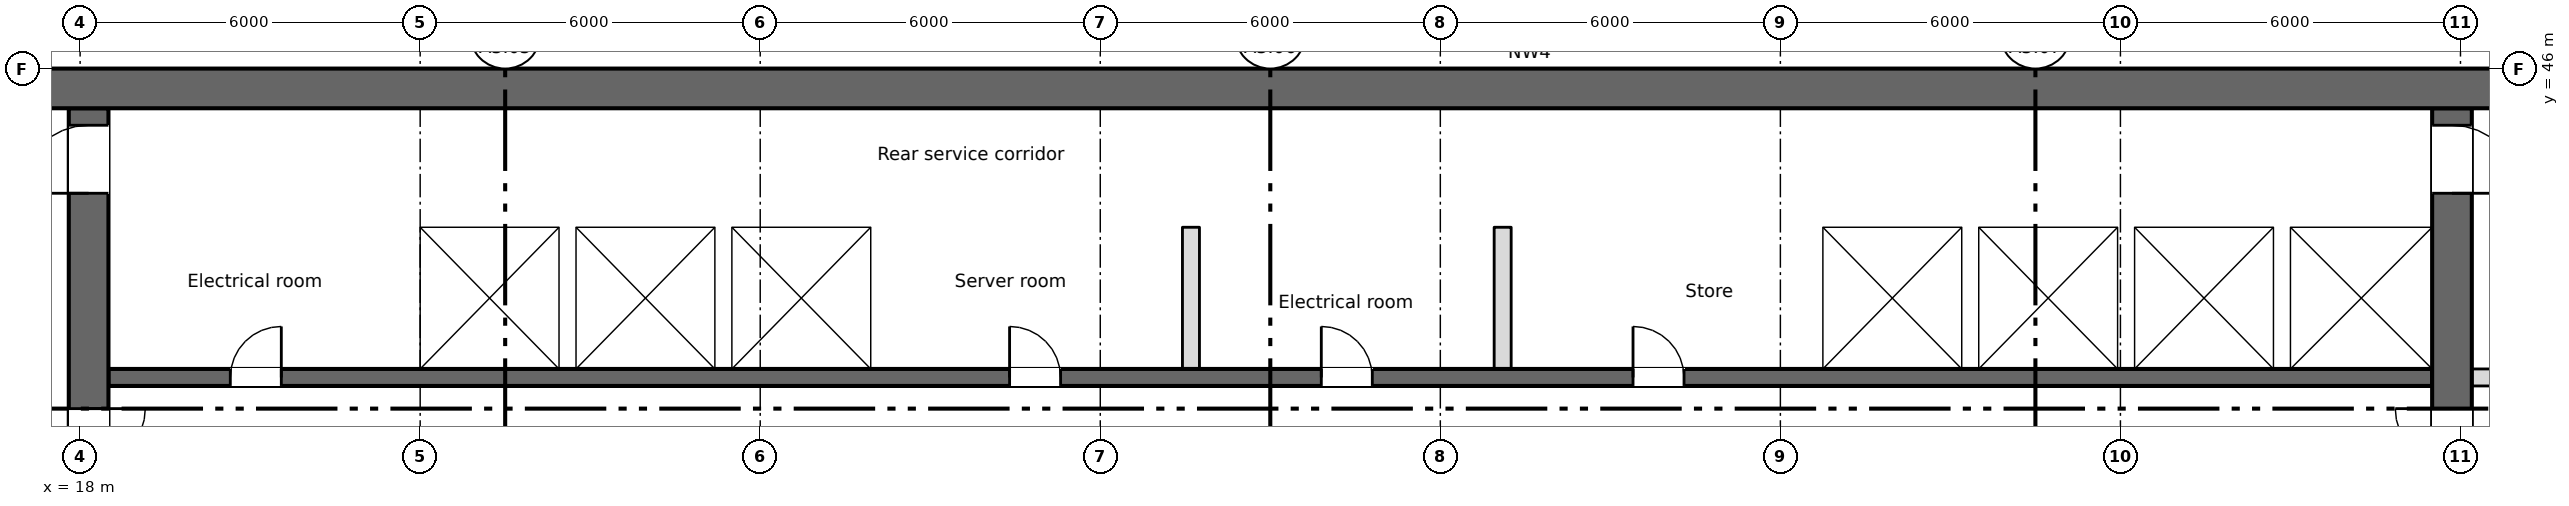
"""IFC4 building model, lengths in metres.
Left out: names, types, materials, properties, quantities, classifications, styles, units other than length and angle.
Written with IfcOpenShell. Run it as: python <this file> out.ifc"""

import sys

from ifc_helpers import new_model, si_unit, direction, frame, frame_2d, origin, place, context, subcontext, project, spatial, rectangle, extrude, element, fill, save


model = new_model("IFC4")
c1 = context("Model", 3, precision=1e-05, world=origin(), true_north=direction((0.0, 1.0)))
c2 = subcontext(c1, "Body", "Model", "MODEL_VIEW")
j1 = project(units=[si_unit("LENGTHUNIT", "METRE"), si_unit("PLANEANGLEUNIT", "RADIAN")], contexts=[c1])
p1 = place(None, origin())
s1 = spatial("IfcSite", under=j1, at=p1, CompositionType="ELEMENT")
p2 = place(p1, origin())
s2 = spatial("IfcBuilding", under=s1, at=p2, CompositionType="ELEMENT")
p3 = place(p2, frame((0.0, 0.0, 170.5)))
s3 = spatial("IfcBuildingStorey", under=s2, at=p3, CompositionType="ELEMENT", Elevation=170.5)
p4 = place(p3, frame((11.55, 45.65, 0.0), z_axis=(0.0, 0.0, 1.0), x_axis=(1.0, 0.0, 0.0)))
e1 = element("IfcWall", 1, at=p4, inside=s3, PredefinedType="SHEAR", context=c2, shape_type="SweptSolid", body=[
    extrude(rectangle(XDim=54.9, YDim=0.7, at=frame_2d((27.45, 0.0))), origin(), (0.0, 0.0, 1.0), 3.35),
])
p5 = place(p4, frame((1.2, 0.0, 0.6)))
e2 = element("IfcOpeningElement", 2, at=p5, cuts=e1, PredefinedType="OPENING", context=c2, shape_type="SweptSolid", body=[
    extrude(rectangle(XDim=0.6, YDim=2.4, at=frame_2d((0.3, 1.2))), frame((0.0, 0.36, 0.0), z_axis=(0.0, -1.0, 0.0), x_axis=(1.0, 0.0, 0.0)), (0.0, 0.0, 1.0), 0.72),
])
p6 = place(p3, frame((18.15, 28.4, 0.0), z_axis=(0.0, 0.0, 1.0), x_axis=(0.0, 1.0, 0.0)))
e3 = element("IfcWall", 3, at=p6, inside=s3, PredefinedType="SHEAR", context=c2, shape_type="SweptSolid", body=[
    extrude(rectangle(XDim=16.9, YDim=0.7, at=frame_2d((8.45, 0.0))), origin(), (0.0, 0.0, 1.0), 3.35),
])
p7 = place(p6, frame((9.6, 0.0, 0.0)))
e4 = element("IfcOpeningElement", 4, at=p7, cuts=e3, PredefinedType="OPENING", context=c2, shape_type="SweptSolid", body=[
    extrude(rectangle(XDim=2.0, YDim=2.1, at=frame_2d((1.0, 1.05))), frame((0.0, 0.36, 0.0), z_axis=(0.0, -1.0, 0.0), x_axis=(1.0, 0.0, 0.0)), (0.0, 0.0, 1.0), 0.72),
])
p8 = place(p6, frame((15.4, 0.0, 0.0)))
e5 = element("IfcOpeningElement", 5, at=p8, cuts=e3, PredefinedType="OPENING", context=c2, shape_type="SweptSolid", body=[
    extrude(rectangle(XDim=1.2, YDim=2.1, at=frame_2d((0.6, 1.05))), frame((0.0, 0.36, 0.0), z_axis=(0.0, -1.0, 0.0), x_axis=(1.0, 0.0, 0.0)), (0.0, 0.0, 1.0), 0.72),
])
p9 = place(p3, frame((59.85, 28.4, 0.0), z_axis=(0.0, 0.0, 1.0), x_axis=(0.0, 1.0, 0.0)))
e6 = element("IfcWall", 6, at=p9, inside=s3, PredefinedType="SHEAR", context=c2, shape_type="SweptSolid", body=[
    extrude(rectangle(XDim=16.9, YDim=0.7, at=frame_2d((8.45, 0.0))), origin(), (0.0, 0.0, 1.0), 3.35),
])
p10 = place(p9, frame((9.6, 0.0, 0.0)))
e7 = element("IfcOpeningElement", 7, at=p10, cuts=e6, PredefinedType="OPENING", context=c2, shape_type="SweptSolid", body=[
    extrude(rectangle(XDim=2.0, YDim=2.1, at=frame_2d((1.0, 1.05))), frame((0.0, 0.36, 0.0), z_axis=(0.0, -1.0, 0.0), x_axis=(1.0, 0.0, 0.0)), (0.0, 0.0, 1.0), 0.72),
])
p11 = place(p9, frame((15.4, 0.0, 0.0)))
e8 = element("IfcOpeningElement", 8, at=p11, cuts=e6, PredefinedType="OPENING", context=c2, shape_type="SweptSolid", body=[
    extrude(rectangle(XDim=1.2, YDim=2.1, at=frame_2d((0.6, 1.05))), frame((0.0, 0.36, 0.0), z_axis=(0.0, -1.0, 0.0), x_axis=(1.0, 0.0, 0.0)), (0.0, 0.0, 1.0), 0.72),
])
p12 = place(p3, frame((18.5, 40.55, 0.0), z_axis=(0.0, 0.0, 1.0), x_axis=(1.0, 0.0, 0.0)))
e9 = element("IfcWall", 9, at=p12, inside=s3, PredefinedType="SHEAR", context=c2, shape_type="SweptSolid", body=[
    extrude(rectangle(XDim=41.0, YDim=0.3, at=frame_2d((20.5, 0.0))), origin(), (0.0, 0.0, 1.0), 3.35),
])
p13 = place(p12, frame((2.15, 0.0, 0.0)))
e10 = element("IfcOpeningElement", 10, at=p13, cuts=e9, PredefinedType="OPENING", context=c2, shape_type="SweptSolid", body=[
    extrude(rectangle(XDim=0.9, YDim=2.1, at=frame_2d((0.45, 1.05))), frame((0.0, 0.16, 0.0), z_axis=(0.0, -1.0, 0.0), x_axis=(1.0, 0.0, 0.0)), (0.0, 0.0, 1.0), 0.32),
])
p14 = place(p12, frame((15.9, 0.0, 0.0)))
e11 = element("IfcOpeningElement", 11, at=p14, cuts=e9, PredefinedType="OPENING", context=c2, shape_type="SweptSolid", body=[
    extrude(rectangle(XDim=0.9, YDim=2.1, at=frame_2d((0.45, 1.05))), frame((0.0, 0.16, 0.0), z_axis=(0.0, -1.0, 0.0), x_axis=(1.0, 0.0, 0.0)), (0.0, 0.0, 1.0), 0.32),
])
p15 = place(p12, frame((21.4, 0.0, 0.0)))
e12 = element("IfcOpeningElement", 12, at=p15, cuts=e9, PredefinedType="OPENING", context=c2, shape_type="SweptSolid", body=[
    extrude(rectangle(XDim=0.9, YDim=2.1, at=frame_2d((0.45, 1.05))), frame((0.0, 0.16, 0.0), z_axis=(0.0, -1.0, 0.0), x_axis=(1.0, 0.0, 0.0)), (0.0, 0.0, 1.0), 0.32),
])
p16 = place(p12, frame((26.9, 0.0, 0.0)))
e13 = element("IfcOpeningElement", 13, at=p16, cuts=e9, PredefinedType="OPENING", context=c2, shape_type="SweptSolid", body=[
    extrude(rectangle(XDim=0.9, YDim=2.1, at=frame_2d((0.45, 1.05))), frame((0.0, 0.16, 0.0), z_axis=(0.0, -1.0, 0.0), x_axis=(1.0, 0.0, 0.0)), (0.0, 0.0, 1.0), 0.32),
])
p17 = place(p12, frame((6.175, 0.0, 0.0)))
e14 = element("IfcOpeningElement", 14, at=p17, cuts=e9, PredefinedType="OPENING", context=c2, shape_type="SweptSolid", body=[
    extrude(rectangle(XDim=1.1, YDim=2.1, at=frame_2d((0.55, 1.05))), frame((0.0, 0.16, 0.0), z_axis=(0.0, -1.0, 0.0), x_axis=(1.0, 0.0, 0.0)), (0.0, 0.0, 1.0), 0.32),
])
p18 = place(p12, frame((8.925, 0.0, 0.0)))
e15 = element("IfcOpeningElement", 15, at=p18, cuts=e9, PredefinedType="OPENING", context=c2, shape_type="SweptSolid", body=[
    extrude(rectangle(XDim=1.1, YDim=2.1, at=frame_2d((0.55, 1.05))), frame((0.0, 0.16, 0.0), z_axis=(0.0, -1.0, 0.0), x_axis=(1.0, 0.0, 0.0)), (0.0, 0.0, 1.0), 0.32),
])
p19 = place(p12, frame((11.675, 0.0, 0.0)))
e16 = element("IfcOpeningElement", 16, at=p19, cuts=e9, PredefinedType="OPENING", context=c2, shape_type="SweptSolid", body=[
    extrude(rectangle(XDim=1.1, YDim=2.1, at=frame_2d((0.55, 1.05))), frame((0.0, 0.16, 0.0), z_axis=(0.0, -1.0, 0.0), x_axis=(1.0, 0.0, 0.0)), (0.0, 0.0, 1.0), 0.32),
])
p20 = place(p12, frame((30.925, 0.0, 0.0)))
e17 = element("IfcOpeningElement", 17, at=p20, cuts=e9, PredefinedType="OPENING", context=c2, shape_type="SweptSolid", body=[
    extrude(rectangle(XDim=1.1, YDim=2.1, at=frame_2d((0.55, 1.05))), frame((0.0, 0.16, 0.0), z_axis=(0.0, -1.0, 0.0), x_axis=(1.0, 0.0, 0.0)), (0.0, 0.0, 1.0), 0.32),
])
p21 = place(p12, frame((33.675, 0.0, 0.0)))
e18 = element("IfcOpeningElement", 18, at=p21, cuts=e9, PredefinedType="OPENING", context=c2, shape_type="SweptSolid", body=[
    extrude(rectangle(XDim=1.1, YDim=2.1, at=frame_2d((0.55, 1.05))), frame((0.0, 0.16, 0.0), z_axis=(0.0, -1.0, 0.0), x_axis=(1.0, 0.0, 0.0)), (0.0, 0.0, 1.0), 0.32),
])
p22 = place(p12, frame((36.375, 0.0, 0.0)))
e19 = element("IfcOpeningElement", 19, at=p22, cuts=e9, PredefinedType="OPENING", context=c2, shape_type="SweptSolid", body=[
    extrude(rectangle(XDim=1.2, YDim=2.1, at=frame_2d((0.6, 1.05))), frame((0.0, 0.16, 0.0), z_axis=(0.0, -1.0, 0.0), x_axis=(1.0, 0.0, 0.0)), (0.0, 0.0, 1.0), 0.32),
])
p23 = place(p12, frame((39.15, 0.0, 0.0)))
e20 = element("IfcOpeningElement", 20, at=p23, cuts=e9, PredefinedType="OPENING", context=c2, shape_type="SweptSolid", body=[
    extrude(rectangle(XDim=1.2, YDim=2.1, at=frame_2d((0.6, 1.05))), frame((0.0, 0.16, 0.0), z_axis=(0.0, -1.0, 0.0), x_axis=(1.0, 0.0, 0.0)), (0.0, 0.0, 1.0), 0.32),
])
p24 = place(p3, frame((18.5, 43.35, 0.0), z_axis=(0.0, 0.0, 1.0), x_axis=(1.0, 0.0, 0.0)))
e21 = element("IfcWall", 21, at=p24, inside=s3, PredefinedType="SHEAR", context=c2, shape_type="SweptSolid", body=[
    extrude(rectangle(XDim=41.0, YDim=0.3, at=frame_2d((20.5, 0.0))), origin(), (0.0, 0.0, 1.0), 3.35),
])
p25 = place(p3, frame((60.2, 40.55, 0.0), z_axis=(0.0, 0.0, 1.0), x_axis=(1.0, 0.0, 0.0)))
e22 = element("IfcWall", 22, at=p25, inside=s3, PredefinedType="PARTITIONING", context=c2, shape_type="SweptSolid", body=[
    extrude(rectangle(XDim=2.5, YDim=0.3, at=frame_2d((1.25, 0.0))), origin(), (0.0, 0.0, 1.0), 3.35),
])
p26 = place(p25, frame((0.725, 0.0, 0.0)))
e23 = element("IfcOpeningElement", 23, at=p26, cuts=e22, PredefinedType="OPENING", context=c2, shape_type="SweptSolid", body=[
    extrude(rectangle(XDim=0.9, YDim=2.1, at=frame_2d((0.45, 1.05))), frame((0.0, 0.16, 0.0), z_axis=(0.0, -1.0, 0.0), x_axis=(1.0, 0.0, 0.0)), (0.0, 0.0, 1.0), 0.32),
])
for number, where, z_axis, x_axis in (
    (24, (23.85, 40.7, 0.0), (0.0, 0.0, 1.0), (0.0, 1.0, 0.0)),
    (25, (26.6, 40.7, 0.0), (0.0, 0.0, 1.0), (0.0, 1.0, 0.0)),
    (26, (29.35, 40.7, 0.0), (0.0, 0.0, 1.0), (0.0, 1.0, 0.0)),
    (27, (32.1, 40.7, 0.0), (0.0, 0.0, 1.0), (0.0, 1.0, 0.0)),
    (28, (48.6, 40.7, 0.0), (0.0, 0.0, 1.0), (0.0, 1.0, 0.0)),
    (29, (51.35, 40.7, 0.0), (0.0, 0.0, 1.0), (0.0, 1.0, 0.0)),
    (30, (54.1, 40.7, 0.0), (0.0, 0.0, 1.0), (0.0, 1.0, 0.0)),
    (31, (56.85, 40.7, 0.0), (0.0, 0.0, 1.0), (0.0, 1.0, 0.0)),
):
    element("IfcWall", number, at=place(p3, frame(where, z_axis=z_axis, x_axis=x_axis)), inside=s3, PredefinedType="SHEAR", context=c2, shape_type="SweptSolid", body=[
        extrude(rectangle(XDim=2.5, YDim=0.3, at=frame_2d((1.25, 0.0))), origin(), (0.0, 0.0, 1.0), 3.35),
    ])
for number, where, z_axis, x_axis in (
    (32, (37.6, 40.7, 0.0), (0.0, 0.0, 1.0), (0.0, 1.0, 0.0)),
    (33, (43.1, 40.7, 0.0), (0.0, 0.0, 1.0), (0.0, 1.0, 0.0)),
):
    element("IfcWall", number, at=place(p3, frame(where, z_axis=z_axis, x_axis=x_axis)), inside=s3, PredefinedType="PARTITIONING", context=c2, shape_type="SweptSolid", body=[
        extrude(rectangle(XDim=2.5, YDim=0.3, at=frame_2d((1.25, 0.0))), origin(), (0.0, 0.0, 1.0), 3.35),
    ])
p27 = place(p13, origin())
e34 = element("IfcDoor", 34, at=p27, inside=s3, OperationType="SINGLE_SWING_RIGHT", PredefinedType="DOOR", context=c2, shape_type="SweptSolid", body=[
    extrude(rectangle(XDim=0.9, YDim=2.1, at=frame_2d((0.45, 1.05))), frame((0.0, 0.025, 0.0), z_axis=(0.0, -1.0, 0.0), x_axis=(1.0, 0.0, 0.0)), (0.0, 0.0, 1.0), 0.05),
])
fill(e10, e34)
p28 = place(p14, origin())
e35 = element("IfcDoor", 35, at=p28, inside=s3, OperationType="SINGLE_SWING_LEFT", PredefinedType="DOOR", context=c2, shape_type="SweptSolid", body=[
    extrude(rectangle(XDim=0.9, YDim=2.1, at=frame_2d((0.45, 1.05))), frame((0.0, 0.025, 0.0), z_axis=(0.0, -1.0, 0.0), x_axis=(1.0, 0.0, 0.0)), (0.0, 0.0, 1.0), 0.05),
])
fill(e11, e35)
p29 = place(p15, origin())
e36 = element("IfcDoor", 36, at=p29, inside=s3, OperationType="SINGLE_SWING_LEFT", PredefinedType="DOOR", context=c2, shape_type="SweptSolid", body=[
    extrude(rectangle(XDim=0.9, YDim=2.1, at=frame_2d((0.45, 1.05))), frame((0.0, 0.025, 0.0), z_axis=(0.0, -1.0, 0.0), x_axis=(1.0, 0.0, 0.0)), (0.0, 0.0, 1.0), 0.05),
])
fill(e12, e36)
p30 = place(p16, origin())
e37 = element("IfcDoor", 37, at=p30, inside=s3, OperationType="SINGLE_SWING_LEFT", PredefinedType="DOOR", context=c2, shape_type="SweptSolid", body=[
    extrude(rectangle(XDim=0.9, YDim=2.1, at=frame_2d((0.45, 1.05))), frame((0.0, 0.025, 0.0), z_axis=(0.0, -1.0, 0.0), x_axis=(1.0, 0.0, 0.0)), (0.0, 0.0, 1.0), 0.05),
])
fill(e13, e37)
p31 = place(p17, origin())
e38 = element("IfcDoor", 38, at=p31, inside=s3, OperationType="SLIDING_TO_LEFT", PredefinedType="DOOR", context=c2, shape_type="SweptSolid", body=[
    extrude(rectangle(XDim=1.1, YDim=2.1, at=frame_2d((0.55, 1.05))), frame((0.0, 0.025, 0.0), z_axis=(0.0, -1.0, 0.0), x_axis=(1.0, 0.0, 0.0)), (0.0, 0.0, 1.0), 0.05),
])
fill(e14, e38)
p32 = place(p18, origin())
e39 = element("IfcDoor", 39, at=p32, inside=s3, OperationType="SLIDING_TO_LEFT", PredefinedType="DOOR", context=c2, shape_type="SweptSolid", body=[
    extrude(rectangle(XDim=1.1, YDim=2.1, at=frame_2d((0.55, 1.05))), frame((0.0, 0.025, 0.0), z_axis=(0.0, -1.0, 0.0), x_axis=(1.0, 0.0, 0.0)), (0.0, 0.0, 1.0), 0.05),
])
fill(e15, e39)
p33 = place(p19, origin())
e40 = element("IfcDoor", 40, at=p33, inside=s3, OperationType="SLIDING_TO_LEFT", PredefinedType="DOOR", context=c2, shape_type="SweptSolid", body=[
    extrude(rectangle(XDim=1.1, YDim=2.1, at=frame_2d((0.55, 1.05))), frame((0.0, 0.025, 0.0), z_axis=(0.0, -1.0, 0.0), x_axis=(1.0, 0.0, 0.0)), (0.0, 0.0, 1.0), 0.05),
])
fill(e16, e40)
p34 = place(p20, origin())
e41 = element("IfcDoor", 41, at=p34, inside=s3, OperationType="SLIDING_TO_LEFT", PredefinedType="DOOR", context=c2, shape_type="SweptSolid", body=[
    extrude(rectangle(XDim=1.1, YDim=2.1, at=frame_2d((0.55, 1.05))), frame((0.0, 0.025, 0.0), z_axis=(0.0, -1.0, 0.0), x_axis=(1.0, 0.0, 0.0)), (0.0, 0.0, 1.0), 0.05),
])
fill(e17, e41)
p35 = place(p21, origin())
e42 = element("IfcDoor", 42, at=p35, inside=s3, OperationType="SLIDING_TO_LEFT", PredefinedType="DOOR", context=c2, shape_type="SweptSolid", body=[
    extrude(rectangle(XDim=1.1, YDim=2.1, at=frame_2d((0.55, 1.05))), frame((0.0, 0.025, 0.0), z_axis=(0.0, -1.0, 0.0), x_axis=(1.0, 0.0, 0.0)), (0.0, 0.0, 1.0), 0.05),
])
fill(e18, e42)
p36 = place(p22, origin())
e43 = element("IfcDoor", 43, at=p36, inside=s3, OperationType="SLIDING_TO_LEFT", PredefinedType="DOOR", context=c2, shape_type="SweptSolid", body=[
    extrude(rectangle(XDim=1.2, YDim=2.1, at=frame_2d((0.6, 1.05))), frame((0.0, 0.025, 0.0), z_axis=(0.0, -1.0, 0.0), x_axis=(1.0, 0.0, 0.0)), (0.0, 0.0, 1.0), 0.05),
])
fill(e19, e43)
p37 = place(p23, origin())
e44 = element("IfcDoor", 44, at=p37, inside=s3, OperationType="SLIDING_TO_LEFT", PredefinedType="DOOR", context=c2, shape_type="SweptSolid", body=[
    extrude(rectangle(XDim=1.2, YDim=2.1, at=frame_2d((0.6, 1.05))), frame((0.0, 0.025, 0.0), z_axis=(0.0, -1.0, 0.0), x_axis=(1.0, 0.0, 0.0)), (0.0, 0.0, 1.0), 0.05),
])
fill(e20, e44)
p38 = place(p7, origin())
e45 = element("IfcDoor", 45, at=p38, inside=s3, OperationType="DOUBLE_DOOR_SINGLE_SWING", PredefinedType="DOOR", context=c2, shape_type="SweptSolid", body=[
    extrude(rectangle(XDim=2.0, YDim=2.1, at=frame_2d((1.0, 1.05))), frame((0.0, 0.025, 0.0), z_axis=(0.0, -1.0, 0.0), x_axis=(1.0, 0.0, 0.0)), (0.0, 0.0, 1.0), 0.05),
])
fill(e4, e45)
p39 = place(p10, origin())
e46 = element("IfcDoor", 46, at=p39, inside=s3, OperationType="DOUBLE_DOOR_SINGLE_SWING", PredefinedType="DOOR", context=c2, shape_type="SweptSolid", body=[
    extrude(rectangle(XDim=2.0, YDim=2.1, at=frame_2d((1.0, 1.05))), frame((0.0, 0.025, 0.0), z_axis=(0.0, -1.0, 0.0), x_axis=(1.0, 0.0, 0.0)), (0.0, 0.0, 1.0), 0.05),
])
fill(e7, e46)
p40 = place(p8, origin())
e47 = element("IfcDoor", 47, at=p40, inside=s3, OperationType="SINGLE_SWING_LEFT", PredefinedType="DOOR", context=c2, shape_type="SweptSolid", body=[
    extrude(rectangle(XDim=1.2, YDim=2.1, at=frame_2d((0.6, 1.05))), frame((0.0, 0.025, 0.0), z_axis=(0.0, -1.0, 0.0), x_axis=(1.0, 0.0, 0.0)), (0.0, 0.0, 1.0), 0.05),
])
fill(e5, e47)
p41 = place(p11, origin())
e48 = element("IfcDoor", 48, at=p41, inside=s3, OperationType="SINGLE_SWING_LEFT", PredefinedType="DOOR", context=c2, shape_type="SweptSolid", body=[
    extrude(rectangle(XDim=1.2, YDim=2.1, at=frame_2d((0.6, 1.05))), frame((0.0, 0.025, 0.0), z_axis=(0.0, -1.0, 0.0), x_axis=(1.0, 0.0, 0.0)), (0.0, 0.0, 1.0), 0.05),
])
fill(e8, e48)
save(model, sys.argv[1])
